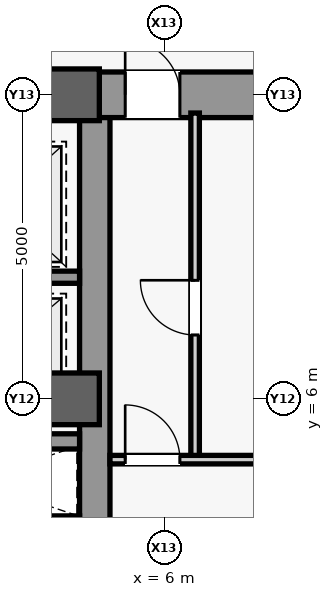
"""IFC4 building model, lengths in metres.
Left out: names, types, materials, properties, quantities, classifications, styles, units other than length and angle.
Written with IfcOpenShell. Run it as: python <this file> out.ifc"""

import sys

from ifc_helpers import new_model, si_unit, direction, frame, frame_2d, origin, origin_2d, place, context, subcontext, project, spatial, rectangle, extrude, source, transform, mapped, element, fill, save


model = new_model("IFC4")
c1 = context("Model", 3, precision=1e-05, world=origin(), true_north=direction((0.0, 1.0)))
c2 = subcontext(c1, "Body", "Model", "MODEL_VIEW")
j1 = project(units=[si_unit("LENGTHUNIT", "METRE"), si_unit("PLANEANGLEUNIT", "RADIAN")], contexts=[c1])
p1 = place(None, origin())
s1 = spatial("IfcSite", under=j1, at=p1, CompositionType="ELEMENT")
p2 = place(p1, origin())
s2 = spatial("IfcBuilding", under=s1, at=p2, CompositionType="ELEMENT")
p3 = place(p2, frame((0.0, 0.0, 207.1)))
s3 = spatial("IfcBuildingStorey", under=s2, at=p3, CompositionType="ELEMENT", Elevation=207.1)
m1 = source(origin(), c2, "Body", "SweptSolid", [
    extrude(rectangle(XDim=21.4, YDim=0.5, at=frame_2d((10.7, 0.0))), origin(), (0.0, 0.0, 1.0), 3.78),
])
p4 = place(p3, frame((4.85, -10.7, 0.0), z_axis=(0.0, 0.0, 1.0), x_axis=(0.0, 1.0, 0.0)))
e1 = element("IfcWall", 1, at=p4, inside=s3, PredefinedType="SHEAR", context=c2, shape_type="MappedRepresentation", body=[
    mapped(m1, transform((0.0, 0.0, 0.0), scale=1.0)),
])
m2 = source(origin(), c2, "Body", "SweptSolid", [
    extrude(rectangle(XDim=5.85, YDim=0.75, at=frame_2d((2.925, 0.0))), origin(), (0.0, 0.0, 1.0), 3.78),
])
p5 = place(p3, frame((4.85, 11.0, 0.0), z_axis=(0.0, 0.0, 1.0), x_axis=(1.0, 0.0, 0.0)))
e2 = element("IfcWall", 2, at=p5, inside=s3, PredefinedType="SHEAR", context=c2, shape_type="MappedRepresentation", body=[
    mapped(m2, transform((0.0, 0.0, 0.0), scale=1.0)),
])
m3 = source(origin(), c2, "Body", "SweptSolid", [
    extrude(rectangle(XDim=0.9, YDim=2.15, at=frame_2d((0.45, 1.075))), frame((0.0, 0.385, 0.0), z_axis=(0.0, -1.0, 0.0), x_axis=(1.0, 0.0, 0.0)), (0.0, 0.0, 1.0), 0.77),
])
p6 = place(p5, frame((0.5, 0.0, 0.0)))
e3 = element("IfcOpeningElement", 3, at=p6, cuts=e2, PredefinedType="OPENING", context=c2, shape_type="MappedRepresentation", body=[
    mapped(m3, transform((0.0, 0.0, 0.0), scale=1.0)),
])
m4 = source(origin(), c2, "Body", "SweptSolid", [
    extrude(rectangle(XDim=9.2, YDim=0.5, at=frame_2d((4.6, 0.0))), origin(), (0.0, 0.0, 1.0), 3.78),
])
p7 = place(p3, frame((-4.6, 11.0, 0.0), z_axis=(0.0, 0.0, 1.0), x_axis=(1.0, 0.0, 0.0)))
e4 = element("IfcWall", 4, at=p7, inside=s3, PredefinedType="SHEAR", context=c2, shape_type="MappedRepresentation", body=[
    mapped(m4, transform((0.0, 0.0, 0.0), scale=1.0)),
])
m5 = source(origin(), c2, "Body", "SweptSolid", [
    extrude(rectangle(XDim=1.8, YDim=2.25, at=frame_2d((0.9, 1.125))), frame((0.0, 0.26, 0.0), z_axis=(0.0, -1.0, 0.0), x_axis=(1.0, 0.0, 0.0)), (0.0, 0.0, 1.0), 0.52),
])
p8 = place(p7, frame((3.7, 0.0, 0.0)))
e5 = element("IfcOpeningElement", 5, at=p8, cuts=e4, PredefinedType="OPENING", context=c2, shape_type="MappedRepresentation", body=[
    mapped(m5, transform((0.0, 0.0, 0.0), scale=1.0)),
])
m6 = source(origin(), c2, "Body", "SweptSolid", [
    extrude(rectangle(XDim=0.85, YDim=0.85, at=origin_2d()), origin(), (0.0, 0.0, 1.0), 4.0),
])
for number, where, z_axis, x_axis in (
    (6, (4.5, 6.0, 0.0), (0.0, 0.0, 1.0), (1.0, 0.0, 0.0)),
    (7, (4.5, 11.0, 0.0), (0.0, 0.0, 1.0), (1.0, 0.0, 0.0)),
):
    element("IfcColumn", number, at=place(p3, frame(where, z_axis=z_axis, x_axis=x_axis)), inside=s3, PredefinedType="COLUMN", context=c2, shape_type="MappedRepresentation", body=[
        mapped(m6, transform((0.0, 0.0, 0.0), scale=1.0)),
    ])
m7 = source(origin(), c2, "Body", "SweptSolid", [
    extrude(rectangle(XDim=5.7, YDim=0.14, at=frame_2d((2.85, 0.0))), origin(), (0.0, 0.0, 1.0), 3.78),
])
p9 = place(p3, frame((6.5, 5.0, 0.0), z_axis=(0.0, 0.0, 1.0), x_axis=(0.0, 1.0, 0.0)))
e8 = element("IfcWall", 8, at=p9, inside=s3, PredefinedType="PARTITIONING", context=c2, shape_type="MappedRepresentation", body=[
    mapped(m7, transform((0.0, 0.0, 0.0), scale=1.0)),
])
m8 = source(origin(), c2, "Body", "SweptSolid", [
    extrude(rectangle(XDim=0.9, YDim=2.15, at=frame_2d((0.45, 1.075))), frame((0.0, 0.08, 0.0), z_axis=(0.0, -1.0, 0.0), x_axis=(1.0, 0.0, 0.0)), (0.0, 0.0, 1.0), 0.16),
])
p10 = place(p9, frame((2.05, 0.0, 0.0)))
e9 = element("IfcOpeningElement", 9, at=p10, cuts=e8, PredefinedType="OPENING", context=c2, shape_type="MappedRepresentation", body=[
    mapped(m8, transform((0.0, 0.0, 0.0), scale=1.0)),
])
m9 = source(origin(), c2, "Body", "SweptSolid", [
    extrude(rectangle(XDim=3.15, YDim=0.14, at=frame_2d((1.575, 0.0))), origin(), (0.0, 0.0, 1.0), 3.78),
])
p11 = place(p3, frame((5.1, 5.0, 0.0), z_axis=(0.0, 0.0, 1.0), x_axis=(1.0, 0.0, 0.0)))
e10 = element("IfcWall", 10, at=p11, inside=s3, PredefinedType="PARTITIONING", context=c2, shape_type="MappedRepresentation", body=[
    mapped(m9, transform((0.0, 0.0, 0.0), scale=1.0)),
])
p12 = place(p11, frame((0.25, 0.0, 0.0)))
e11 = element("IfcOpeningElement", 11, at=p12, cuts=e10, PredefinedType="OPENING", context=c2, shape_type="MappedRepresentation", body=[
    mapped(m8, transform((0.0, 0.0, 0.0), scale=1.0)),
])
m10 = source(origin(), c2, "Body", "SweptSolid", [
    extrude(rectangle(XDim=3.45, YDim=0.15, at=frame_2d((1.725, 0.0))), origin(), (0.0, 0.0, 1.0), 3.78),
])
p13 = place(p3, frame((1.15, 4.0, 0.0), z_axis=(0.0, 0.0, 1.0), x_axis=(1.0, 0.0, 0.0)))
e12 = element("IfcWall", 12, at=p13, inside=s3, PredefinedType="PARTITIONING", context=c2, shape_type="MappedRepresentation", body=[
    mapped(m10, transform((0.0, 0.0, 0.0), scale=1.0)),
])
m11 = source(origin(), c2, "Body", "SweptSolid", [
    extrude(rectangle(XDim=2.45, YDim=0.2, at=frame_2d((1.225, 0.0))), origin(), (0.0, 0.0, 1.0), 3.78),
])
p14 = place(p3, frame((2.15, 8.0, 0.0), z_axis=(0.0, 0.0, 1.0), x_axis=(1.0, 0.0, 0.0)))
e13 = element("IfcWall", 13, at=p14, inside=s3, PredefinedType="SHEAR", context=c2, shape_type="MappedRepresentation", body=[
    mapped(m11, transform((0.0, 0.0, 0.0), scale=1.0)),
])
m12 = source(origin(), c2, "Body", "SweptSolid", [
    extrude(rectangle(XDim=9.2, YDim=0.25, at=frame_2d((4.6, 0.0))), origin(), (0.0, 0.0, 1.0), 3.78),
])
p15 = place(p3, frame((-4.6, 5.3, 0.0), z_axis=(0.0, 0.0, 1.0), x_axis=(1.0, 0.0, 0.0)))
e14 = element("IfcWall", 14, at=p15, inside=s3, PredefinedType="SHEAR", context=c2, shape_type="MappedRepresentation", body=[
    mapped(m12, transform((0.0, 0.0, 0.0), scale=1.0)),
])
m13 = source(origin(), c2, "Body", "SweptSolid", [
    extrude(rectangle(XDim=1.05, YDim=2.2, at=frame_2d((0.525, 1.1))), frame((0.0, 0.135, 0.0), z_axis=(0.0, -1.0, 0.0), x_axis=(1.0, 0.0, 0.0)), (0.0, 0.0, 1.0), 0.27),
])
p16 = place(p15, frame((4.075, 0.0, 0.0)))
e15 = element("IfcOpeningElement", 15, at=p16, cuts=e14, PredefinedType="OPENING", context=c2, shape_type="MappedRepresentation", body=[
    mapped(m13, transform((0.0, 0.0, 0.0), scale=1.0)),
])
m14 = source(origin(), c2, "Body", "SweptSolid", [
    extrude(rectangle(XDim=0.9, YDim=2.15, at=frame_2d((0.45, 1.075))), frame((0.0, 0.025, 0.0), z_axis=(0.0, -1.0, 0.0), x_axis=(1.0, 0.0, 0.0)), (0.0, 0.0, 1.0), 0.05),
])
p17 = place(p6, origin())
e16 = element("IfcDoor", 16, at=p17, inside=s3, OperationType="SINGLE_SWING_LEFT", PredefinedType="DOOR", context=c2, shape_type="MappedRepresentation", body=[
    mapped(m14, transform((0.0, 0.0, 0.0), scale=1.0)),
])
fill(e3, e16)
p18 = place(p10, origin())
e17 = element("IfcDoor", 17, at=p18, inside=s3, OperationType="SINGLE_SWING_RIGHT", PredefinedType="DOOR", context=c2, shape_type="MappedRepresentation", body=[
    mapped(m14, transform((0.0, 0.0, 0.0), scale=1.0)),
])
fill(e9, e17)
p19 = place(p12, origin())
e18 = element("IfcDoor", 18, at=p19, inside=s3, OperationType="SINGLE_SWING_LEFT", PredefinedType="DOOR", context=c2, shape_type="MappedRepresentation", body=[
    mapped(m14, transform((0.0, 0.0, 0.0), scale=1.0)),
])
fill(e11, e18)
save(model, sys.argv[1])
